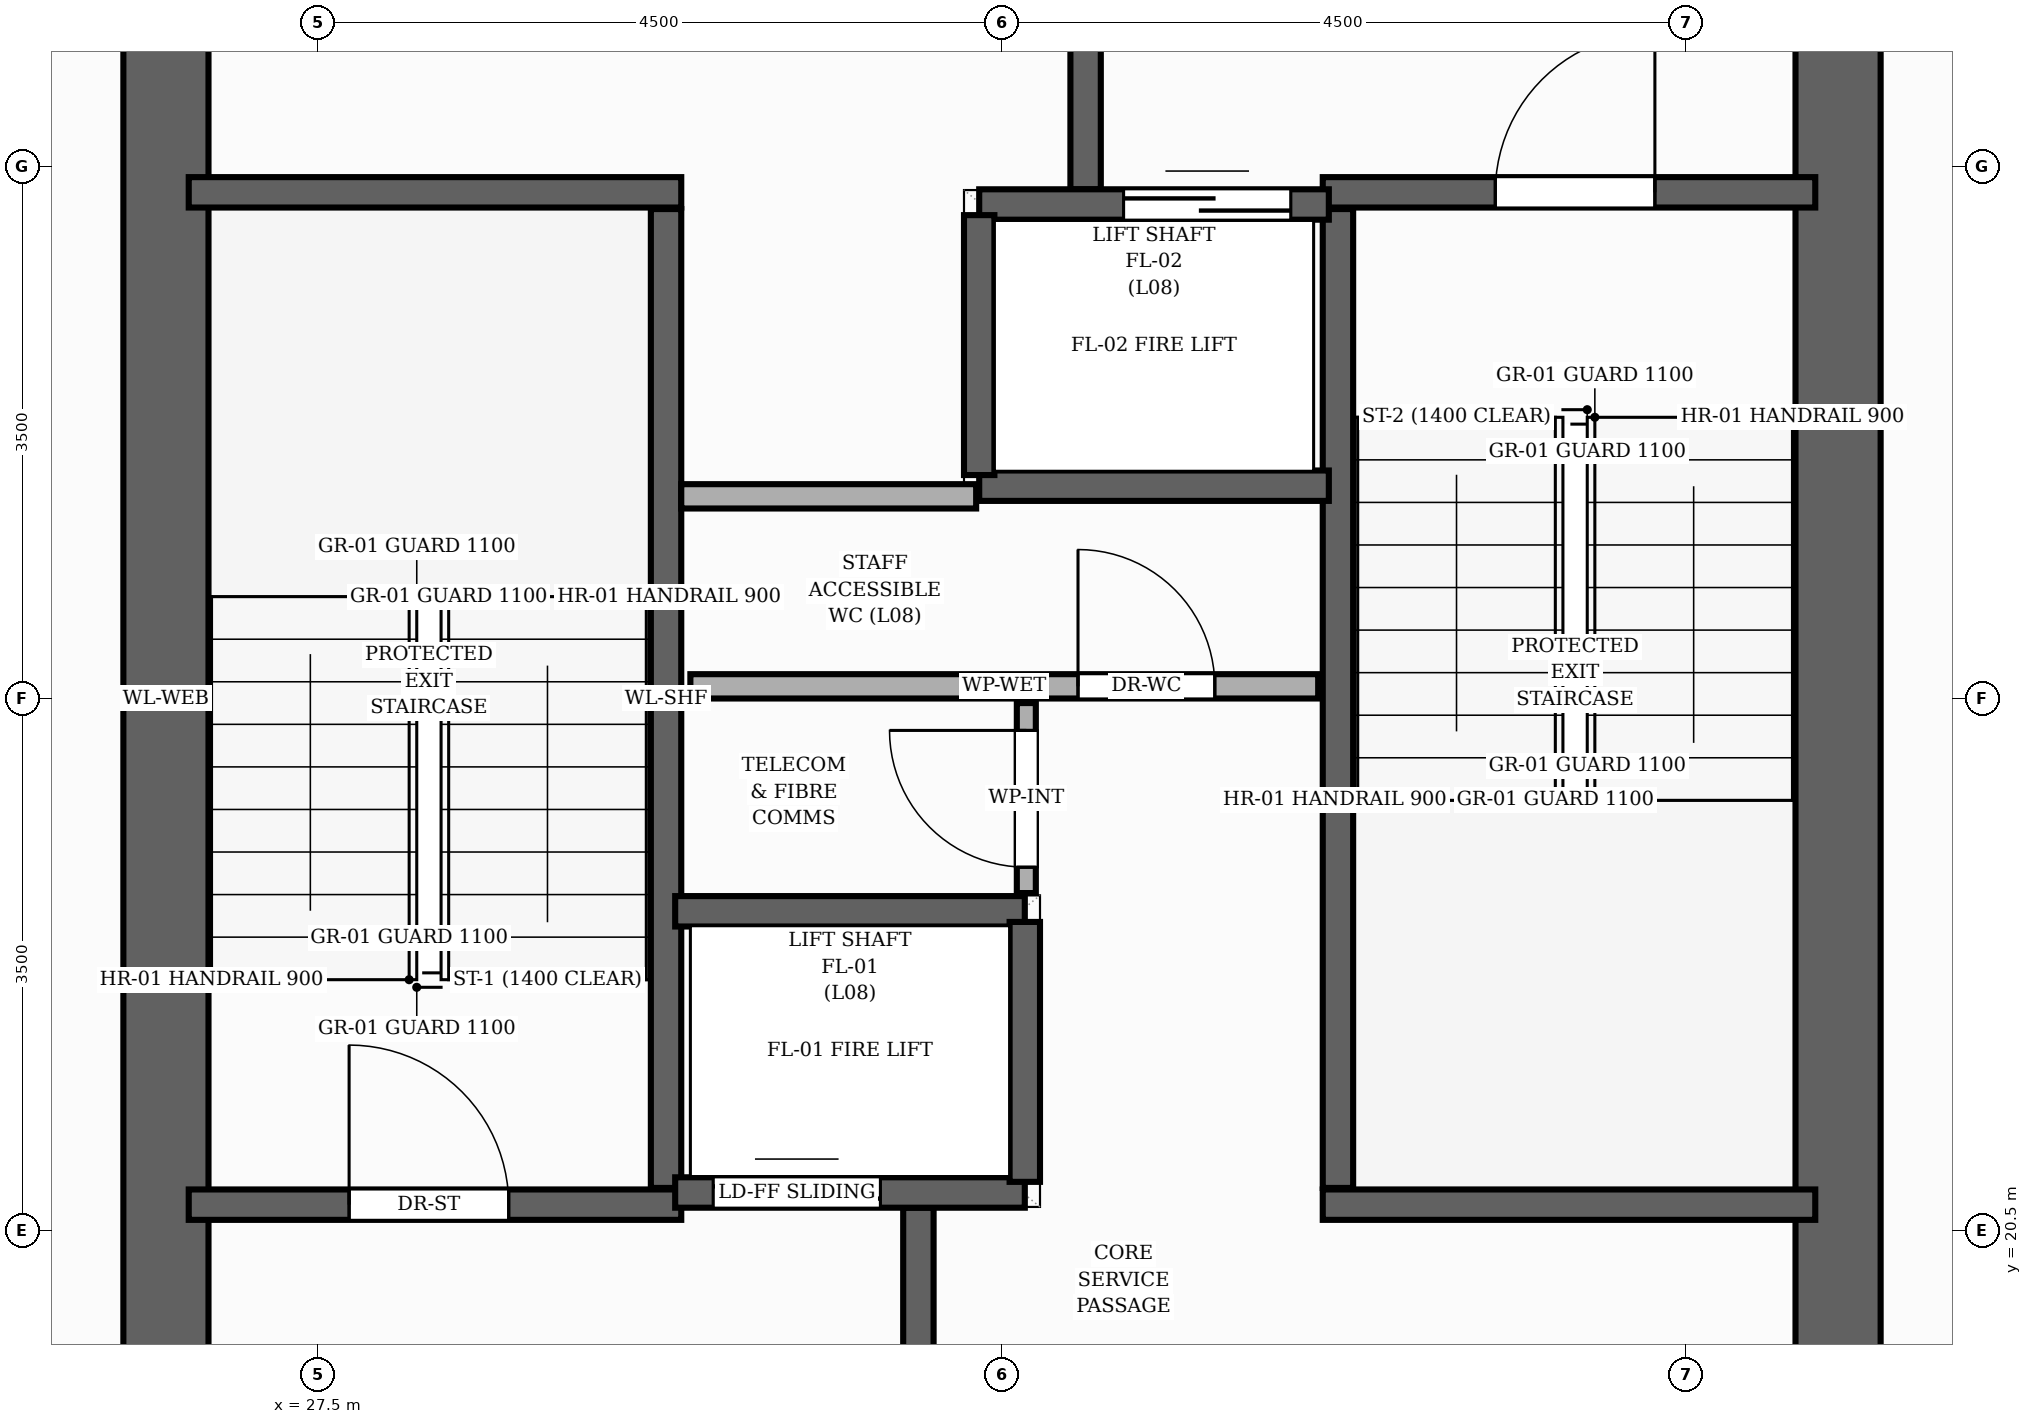
"""IFC4 building model, lengths in metres.
Left out: names, types, materials, properties, quantities, classifications, styles, units other than length and angle.
Written with IfcOpenShell. Run it as: python <this file> out.ifc"""

import sys

from ifc_helpers import new_model, si_unit, direction, frame, frame_2d, origin, place, context, subcontext, project, spatial, rectangle, extrude, element, fill, save


model = new_model("IFC4")
c1 = context("Model", 3, precision=1e-05, world=origin(), true_north=direction((0.0, 1.0)))
c2 = subcontext(c1, "Body", "Model", "MODEL_VIEW")
j1 = project(units=[si_unit("LENGTHUNIT", "METRE"), si_unit("PLANEANGLEUNIT", "RADIAN")], contexts=[c1])
p1 = place(None, origin())
s1 = spatial("IfcSite", under=j1, at=p1, CompositionType="ELEMENT")
p2 = place(p1, origin())
s2 = spatial("IfcBuilding", under=s1, at=p2, CompositionType="ELEMENT")
p3 = place(p2, frame((0.0, 0.0, 31.2)))
s3 = spatial("IfcBuildingStorey", under=s2, at=p3, CompositionType="ELEMENT", Elevation=31.2)
for number, where, z_axis, x_axis in (
    (1, (26.5, 17.4, 0.0), (0.0, 0.0, 1.0), (0.0, 1.0, 0.0)),
    (2, (37.5, 17.4, 0.0), (0.0, 0.0, 1.0), (0.0, 1.0, 0.0)),
):
    element("IfcWall", number, at=place(p3, frame(where, z_axis=z_axis, x_axis=x_axis)), inside=s3, PredefinedType="SHEAR", context=c2, shape_type="SweptSolid", body=[
        extrude(rectangle(XDim=13.2, YDim=0.56, at=frame_2d((6.6, 0.0))), origin(), (0.0, 0.0, 1.0), 3.2),
    ])
p4 = place(p3, frame((29.79, 20.78, 0.0), z_axis=(0.0, 0.0, 1.0), x_axis=(0.0, 1.0, 0.0)))
e3 = element("IfcWall", 3, at=p4, inside=s3, PredefinedType="SHEAR", context=c2, shape_type="SweptSolid", body=[
    extrude(rectangle(XDim=6.44, YDim=0.2, at=frame_2d((3.22, 0.0))), origin(), (0.0, 0.0, 1.0), 3.2),
])
p5 = place(p3, frame((26.65, 27.33, 0.0), z_axis=(0.0, 0.0, 1.0), x_axis=(1.0, 0.0, 0.0)))
e4 = element("IfcWall", 4, at=p5, inside=s3, PredefinedType="SHEAR", context=c2, shape_type="SweptSolid", body=[
    extrude(rectangle(XDim=3.24, YDim=0.2, at=frame_2d((1.62, 0.0))), origin(), (0.0, 0.0, 1.0), 3.2),
])
p6 = place(p3, frame((26.65, 20.67, 0.0), z_axis=(0.0, 0.0, 1.0), x_axis=(1.0, 0.0, 0.0)))
e5 = element("IfcWall", 5, at=p6, inside=s3, PredefinedType="SHEAR", context=c2, shape_type="SweptSolid", body=[
    extrude(rectangle(XDim=3.24, YDim=0.2, at=frame_2d((1.62, 0.0))), origin(), (0.0, 0.0, 1.0), 3.2),
])
p7 = place(p6, frame((1.055, 0.0, 0.0)))
e6 = element("IfcOpeningElement", 6, at=p7, cuts=e5, PredefinedType="OPENING", context=c2, shape_type="SweptSolid", body=[
    extrude(rectangle(XDim=1.05, YDim=2.15, at=frame_2d((0.525, 1.075))), frame((0.0, 0.11, 0.0), z_axis=(0.0, -1.0, 0.0), x_axis=(1.0, 0.0, 0.0)), (0.0, 0.0, 1.0), 0.22),
])
p8 = place(p3, frame((34.21, 20.78, 0.0), z_axis=(0.0, 0.0, 1.0), x_axis=(0.0, 1.0, 0.0)))
e7 = element("IfcWall", 7, at=p8, inside=s3, PredefinedType="SHEAR", context=c2, shape_type="SweptSolid", body=[
    extrude(rectangle(XDim=6.44, YDim=0.2, at=frame_2d((3.22, 0.0))), origin(), (0.0, 0.0, 1.0), 3.2),
])
p9 = place(p3, frame((34.11, 20.67, 0.0), z_axis=(0.0, 0.0, 1.0), x_axis=(1.0, 0.0, 0.0)))
e8 = element("IfcWall", 8, at=p9, inside=s3, PredefinedType="SHEAR", context=c2, shape_type="SweptSolid", body=[
    extrude(rectangle(XDim=3.24, YDim=0.2, at=frame_2d((1.62, 0.0))), origin(), (0.0, 0.0, 1.0), 3.2),
])
p10 = place(p3, frame((34.11, 27.33, 0.0), z_axis=(0.0, 0.0, 1.0), x_axis=(1.0, 0.0, 0.0)))
e9 = element("IfcWall", 9, at=p10, inside=s3, PredefinedType="SHEAR", context=c2, shape_type="SweptSolid", body=[
    extrude(rectangle(XDim=3.24, YDim=0.2, at=frame_2d((1.62, 0.0))), origin(), (0.0, 0.0, 1.0), 3.2),
])
p11 = place(p10, frame((1.135, 0.0, 0.0)))
e10 = element("IfcOpeningElement", 10, at=p11, cuts=e9, PredefinedType="OPENING", context=c2, shape_type="SweptSolid", body=[
    extrude(rectangle(XDim=1.05, YDim=2.15, at=frame_2d((0.525, 1.075))), frame((0.0, 0.11, 0.0), z_axis=(0.0, -1.0, 0.0), x_axis=(1.0, 0.0, 0.0)), (0.0, 0.0, 1.0), 0.22),
])
for number, where, z_axis, x_axis in (
    (11, (31.45, 17.15, 0.0), (0.0, 0.0, 1.0), (0.0, 1.0, 0.0)),
    (12, (32.55, 27.35, 0.0), (0.0, 0.0, 1.0), (0.0, 1.0, 0.0)),
):
    element("IfcWall", number, at=place(p3, frame(where, z_axis=z_axis, x_axis=x_axis)), inside=s3, PredefinedType="SHEAR", context=c2, shape_type="SweptSolid", body=[
        extrude(rectangle(XDim=3.5, YDim=0.2, at=frame_2d((1.75, 0.0))), origin(), (0.0, 0.0, 1.0), 3.2),
    ])
p12 = place(p3, frame((29.85, 20.75, 0.0), z_axis=(0.0, 0.0, 1.0), x_axis=(1.0, 0.0, 0.0)))
e13 = element("IfcWall", 13, at=p12, inside=s3, PredefinedType="SHEAR", context=c2, shape_type="SweptSolid", body=[
    extrude(rectangle(XDim=2.3, YDim=0.2, at=frame_2d((1.15, 0.0))), origin(), (0.0, 0.0, 1.0), 3.2),
])
p13 = place(p12, frame((0.25, 0.0, 0.0)))
e14 = element("IfcOpeningElement", 14, at=p13, cuts=e13, PredefinedType="OPENING", context=c2, shape_type="SweptSolid", body=[
    extrude(rectangle(XDim=1.1, YDim=2.15, at=frame_2d((0.55, 1.075))), frame((0.0, 0.11, 0.0), z_axis=(0.0, -1.0, 0.0), x_axis=(1.0, 0.0, 0.0)), (0.0, 0.0, 1.0), 0.22),
])
p14 = place(p3, frame((29.85, 22.6, 0.0), z_axis=(0.0, 0.0, 1.0), x_axis=(1.0, 0.0, 0.0)))
e15 = element("IfcWall", 15, at=p14, inside=s3, PredefinedType="SHEAR", context=c2, shape_type="SweptSolid", body=[
    extrude(rectangle(XDim=2.3, YDim=0.2, at=frame_2d((1.15, 0.0))), origin(), (0.0, 0.0, 1.0), 3.2),
])
p15 = place(p3, frame((32.15, 20.82, 0.0), z_axis=(0.0, 0.0, 1.0), x_axis=(0.0, 1.0, 0.0)))
e16 = element("IfcWall", 16, at=p15, inside=s3, PredefinedType="SHEAR", context=c2, shape_type="SweptSolid", body=[
    extrude(rectangle(XDim=1.71, YDim=0.2, at=frame_2d((0.855, 0.0))), origin(), (0.0, 0.0, 1.0), 3.2),
])
p16 = place(p3, frame((31.85, 27.25, 0.0), z_axis=(0.0, 0.0, 1.0), x_axis=(1.0, 0.0, 0.0)))
e17 = element("IfcWall", 17, at=p16, inside=s3, PredefinedType="SHEAR", context=c2, shape_type="SweptSolid", body=[
    extrude(rectangle(XDim=2.3, YDim=0.2, at=frame_2d((1.15, 0.0))), origin(), (0.0, 0.0, 1.0), 3.2),
])
p17 = place(p16, frame((0.95, 0.0, 0.0)))
e18 = element("IfcOpeningElement", 18, at=p17, cuts=e17, PredefinedType="OPENING", context=c2, shape_type="SweptSolid", body=[
    extrude(rectangle(XDim=1.1, YDim=2.15, at=frame_2d((0.55, 1.075))), frame((0.0, 0.11, 0.0), z_axis=(0.0, -1.0, 0.0), x_axis=(1.0, 0.0, 0.0)), (0.0, 0.0, 1.0), 0.22),
])
p18 = place(p3, frame((31.85, 25.4, 0.0), z_axis=(0.0, 0.0, 1.0), x_axis=(1.0, 0.0, 0.0)))
e19 = element("IfcWall", 19, at=p18, inside=s3, PredefinedType="SHEAR", context=c2, shape_type="SweptSolid", body=[
    extrude(rectangle(XDim=2.3, YDim=0.2, at=frame_2d((1.15, 0.0))), origin(), (0.0, 0.0, 1.0), 3.2),
])
p19 = place(p3, frame((31.85, 25.47, 0.0), z_axis=(0.0, 0.0, 1.0), x_axis=(0.0, 1.0, 0.0)))
e20 = element("IfcWall", 20, at=p19, inside=s3, PredefinedType="SHEAR", context=c2, shape_type="SweptSolid", body=[
    extrude(rectangle(XDim=1.71, YDim=0.2, at=frame_2d((0.855, 0.0))), origin(), (0.0, 0.0, 1.0), 3.2),
])
p20 = place(p3, frame((29.95, 24.08, 0.0), z_axis=(0.0, 0.0, 1.0), x_axis=(1.0, 0.0, 0.0)))
e21 = element("IfcWall", 21, at=p20, inside=s3, PredefinedType="PLUMBINGWALL", context=c2, shape_type="SweptSolid", body=[
    extrude(rectangle(XDim=4.13, YDim=0.16, at=frame_2d((2.065, 0.0))), origin(), (0.0, 0.0, 1.0), 2.955),
])
p21 = place(p20, frame((2.55, 0.0, 0.0)))
e22 = element("IfcOpeningElement", 22, at=p21, cuts=e21, PredefinedType="OPENING", context=c2, shape_type="SweptSolid", body=[
    extrude(rectangle(XDim=0.9, YDim=2.1, at=frame_2d((0.45, 1.05))), frame((0.0, 0.09, 0.0), z_axis=(0.0, -1.0, 0.0), x_axis=(1.0, 0.0, 0.0)), (0.0, 0.0, 1.0), 0.18),
])
p22 = place(p3, frame((32.16, 22.72, 0.0), z_axis=(0.0, 0.0, 1.0), x_axis=(0.0, 1.0, 0.0)))
e23 = element("IfcWall", 23, at=p22, inside=s3, PredefinedType="PARTITIONING", context=c2, shape_type="SweptSolid", body=[
    extrude(rectangle(XDim=1.25, YDim=0.125, at=frame_2d((0.625, 0.0))), origin(), (0.0, 0.0, 1.0), 2.955),
])
p23 = place(p22, frame((0.17, 0.0, 0.0)))
e24 = element("IfcOpeningElement", 24, at=p23, cuts=e23, PredefinedType="OPENING", context=c2, shape_type="SweptSolid", body=[
    extrude(rectangle(XDim=0.9, YDim=2.1, at=frame_2d((0.45, 1.05))), frame((0.0, 0.073, 0.0), z_axis=(0.0, -1.0, 0.0), x_axis=(1.0, 0.0, 0.0)), (0.0, 0.0, 1.0), 0.145),
])
p24 = place(p3, frame((29.89, 25.33, 0.0), z_axis=(0.0, 0.0, 1.0), x_axis=(1.0, 0.0, 0.0)))
e25 = element("IfcWall", 25, at=p24, inside=s3, PredefinedType="PLUMBINGWALL", context=c2, shape_type="SweptSolid", body=[
    extrude(rectangle(XDim=1.94, YDim=0.16, at=frame_2d((0.97, 0.0))), origin(), (0.0, 0.0, 1.0), 2.955),
])
p25 = place(p7, origin())
e26 = element("IfcDoor", 26, at=p25, inside=s3, OperationType="SINGLE_SWING_LEFT", PredefinedType="DOOR", context=c2, shape_type="SweptSolid", body=[
    extrude(rectangle(XDim=1.05, YDim=2.15, at=frame_2d((0.525, 1.075))), frame((0.0, 0.025, 0.0), z_axis=(0.0, -1.0, 0.0), x_axis=(1.0, 0.0, 0.0)), (0.0, 0.0, 1.0), 0.05),
])
fill(e6, e26)
p26 = place(p11, origin())
e27 = element("IfcDoor", 27, at=p26, inside=s3, OperationType="SINGLE_SWING_RIGHT", PredefinedType="DOOR", context=c2, shape_type="SweptSolid", body=[
    extrude(rectangle(XDim=1.05, YDim=2.15, at=frame_2d((0.525, 1.075))), frame((0.0, 0.025, 0.0), z_axis=(0.0, -1.0, 0.0), x_axis=(1.0, 0.0, 0.0)), (0.0, 0.0, 1.0), 0.05),
])
fill(e10, e27)
p27 = place(p13, origin())
e28 = element("IfcDoor", 28, at=p27, inside=s3, OperationType="DOUBLE_DOOR_SLIDING", PredefinedType="DOOR", context=c2, shape_type="SweptSolid", body=[
    extrude(rectangle(XDim=1.1, YDim=2.15, at=frame_2d((0.55, 1.075))), frame((0.0, 0.025, 0.0), z_axis=(0.0, -1.0, 0.0), x_axis=(1.0, 0.0, 0.0)), (0.0, 0.0, 1.0), 0.05),
])
fill(e14, e28)
p28 = place(p17, origin())
e29 = element("IfcDoor", 29, at=p28, inside=s3, OperationType="DOUBLE_DOOR_SLIDING", PredefinedType="DOOR", context=c2, shape_type="SweptSolid", body=[
    extrude(rectangle(XDim=1.1, YDim=2.15, at=frame_2d((0.55, 1.075))), frame((0.0, 0.025, 0.0), z_axis=(0.0, -1.0, 0.0), x_axis=(1.0, 0.0, 0.0)), (0.0, 0.0, 1.0), 0.05),
])
fill(e18, e29)
p29 = place(p21, origin())
e30 = element("IfcDoor", 30, at=p29, inside=s3, OperationType="SINGLE_SWING_LEFT", PredefinedType="DOOR", context=c2, shape_type="SweptSolid", body=[
    extrude(rectangle(XDim=0.9, YDim=2.1, at=frame_2d((0.45, 1.05))), frame((0.0, 0.025, 0.0), z_axis=(0.0, -1.0, 0.0), x_axis=(1.0, 0.0, 0.0)), (0.0, 0.0, 1.0), 0.05),
])
fill(e22, e30)
p30 = place(p23, origin())
e31 = element("IfcDoor", 31, at=p30, inside=s3, OperationType="SINGLE_SWING_RIGHT", PredefinedType="DOOR", context=c2, shape_type="SweptSolid", body=[
    extrude(rectangle(XDim=0.9, YDim=2.1, at=frame_2d((0.45, 1.05))), frame((0.0, 0.025, 0.0), z_axis=(0.0, -1.0, 0.0), x_axis=(1.0, 0.0, 0.0)), (0.0, 0.0, 1.0), 0.05),
])
fill(e24, e31)
save(model, sys.argv[1])
